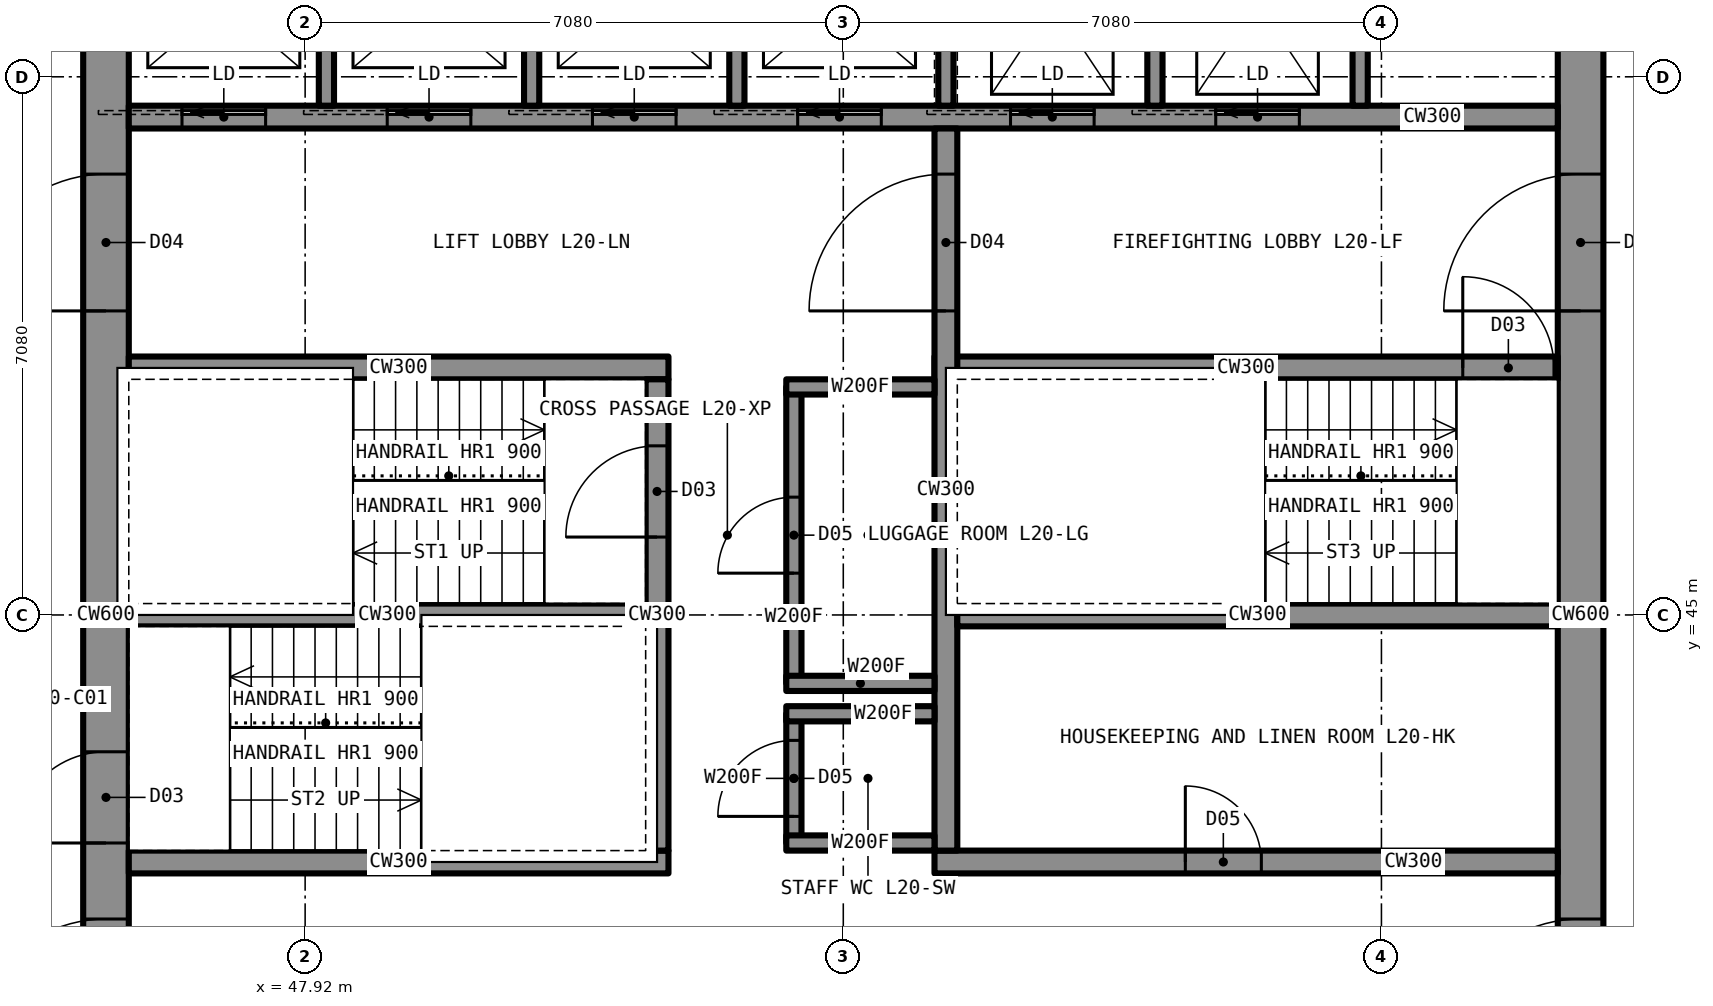
"""IFC4 building model, lengths in metres.
Left out: names, types, materials, properties, quantities, classifications, styles, units other than length and angle.
Written with IfcOpenShell. Run it as: python <this file> out.ifc"""

import sys

from ifc_helpers import new_model, si_unit, direction, frame, frame_2d, origin, place, context, subcontext, project, spatial, rectangle, extrude, element, fill, save


model = new_model("IFC4")
c1 = context("Model", 3, precision=1e-05, world=origin(), true_north=direction((0.0, 1.0)))
c2 = subcontext(c1, "Body", "Model", "MODEL_VIEW")
j1 = project(units=[si_unit("LENGTHUNIT", "METRE"), si_unit("PLANEANGLEUNIT", "RADIAN")], contexts=[c1])
p1 = place(None, origin())
s1 = spatial("IfcSite", under=j1, at=p1, CompositionType="ELEMENT")
p2 = place(p1, origin())
s2 = spatial("IfcBuilding", under=s1, at=p2, CompositionType="ELEMENT")
p3 = place(p2, frame((0.0, 0.0, 70.5)))
s3 = spatial("IfcBuildingStorey", under=s2, at=p3, CompositionType="ELEMENT", Elevation=70.5)
p4 = place(p3, frame((64.7, 35.6, 0.0), z_axis=(0.0, 0.0, 1.0), x_axis=(0.0, 1.0, 0.0)))
e1 = element("IfcWall", 1, at=p4, inside=s3, PredefinedType="SHEAR", context=c2, shape_type="SweptSolid", body=[
    extrude(rectangle(XDim=18.8, YDim=0.6, at=frame_2d((9.4, 0.0))), origin(), (0.0, 0.0, 1.0), 3.5),
])
p5 = place(p4, frame((13.4, 0.0, 0.0)))
e2 = element("IfcOpeningElement", 2, at=p5, cuts=e1, PredefinedType="OPENING", context=c2, shape_type="SweptSolid", body=[
    extrude(rectangle(XDim=1.8, YDim=2.2, at=frame_2d((0.9, 1.1))), frame((0.0, 0.31, 0.0), z_axis=(0.0, -1.0, 0.0), x_axis=(1.0, 0.0, 0.0)), (0.0, 0.0, 1.0), 0.62),
])
p6 = place(p4, frame((3.6, 0.0, 0.0)))
e3 = element("IfcOpeningElement", 3, at=p6, cuts=e1, PredefinedType="OPENING", context=c2, shape_type="SweptSolid", body=[
    extrude(rectangle(XDim=1.8, YDim=2.2, at=frame_2d((0.9, 1.1))), frame((0.0, 0.31, 0.0), z_axis=(0.0, -1.0, 0.0), x_axis=(1.0, 0.0, 0.0)), (0.0, 0.0, 1.0), 0.62),
])
p7 = place(p3, frame((45.3, 35.6, 0.0), z_axis=(0.0, 0.0, 1.0), x_axis=(0.0, 1.0, 0.0)))
e4 = element("IfcWall", 4, at=p7, inside=s3, PredefinedType="SHEAR", context=c2, shape_type="SweptSolid", body=[
    extrude(rectangle(XDim=18.8, YDim=0.6, at=frame_2d((9.4, 0.0))), origin(), (0.0, 0.0, 1.0), 3.5),
])
p8 = place(p7, frame((13.4, 0.0, 0.0)))
e5 = element("IfcOpeningElement", 5, at=p8, cuts=e4, PredefinedType="OPENING", context=c2, shape_type="SweptSolid", body=[
    extrude(rectangle(XDim=1.8, YDim=2.2, at=frame_2d((0.9, 1.1))), frame((0.0, 0.31, 0.0), z_axis=(0.0, -1.0, 0.0), x_axis=(1.0, 0.0, 0.0)), (0.0, 0.0, 1.0), 0.62),
])
p9 = place(p7, frame((3.6, 0.0, 0.0)))
e6 = element("IfcOpeningElement", 6, at=p9, cuts=e4, PredefinedType="OPENING", context=c2, shape_type="SweptSolid", body=[
    extrude(rectangle(XDim=1.8, YDim=2.2, at=frame_2d((0.9, 1.1))), frame((0.0, 0.31, 0.0), z_axis=(0.0, -1.0, 0.0), x_axis=(1.0, 0.0, 0.0)), (0.0, 0.0, 1.0), 0.62),
])
p10 = place(p7, frame((6.4, 0.0, 0.0)))
e7 = element("IfcOpeningElement", 7, at=p10, cuts=e4, PredefinedType="OPENING", context=c2, shape_type="SweptSolid", body=[
    extrude(rectangle(XDim=1.2, YDim=2.2, at=frame_2d((0.6, 1.1))), frame((0.0, 0.31, 0.0), z_axis=(0.0, -1.0, 0.0), x_axis=(1.0, 0.0, 0.0)), (0.0, 0.0, 1.0), 0.62),
])
p11 = place(p3, frame((45.6, 51.55, 0.0), z_axis=(0.0, 0.0, 1.0), x_axis=(1.0, 0.0, 0.0)))
e8 = element("IfcWall", 8, at=p11, inside=s3, PredefinedType="SHEAR", context=c2, shape_type="SweptSolid", body=[
    extrude(rectangle(XDim=18.8, YDim=0.3, at=frame_2d((9.4, 0.0))), origin(), (0.0, 0.0, 1.0), 3.5),
])
p12 = place(p11, frame((0.7, 0.0, 0.0)))
e9 = element("IfcOpeningElement", 9, at=p12, cuts=e8, PredefinedType="OPENING", context=c2, shape_type="SweptSolid", body=[
    extrude(rectangle(XDim=1.1, YDim=2.2, at=frame_2d((0.55, 1.1))), frame((0.0, 0.16, 0.0), z_axis=(0.0, -1.0, 0.0), x_axis=(1.0, 0.0, 0.0)), (0.0, 0.0, 1.0), 0.32),
])
p13 = place(p11, frame((3.4, 0.0, 0.0)))
e10 = element("IfcOpeningElement", 10, at=p13, cuts=e8, PredefinedType="OPENING", context=c2, shape_type="SweptSolid", body=[
    extrude(rectangle(XDim=1.1, YDim=2.2, at=frame_2d((0.55, 1.1))), frame((0.0, 0.16, 0.0), z_axis=(0.0, -1.0, 0.0), x_axis=(1.0, 0.0, 0.0)), (0.0, 0.0, 1.0), 0.32),
])
p14 = place(p11, frame((6.1, 0.0, 0.0)))
e11 = element("IfcOpeningElement", 11, at=p14, cuts=e8, PredefinedType="OPENING", context=c2, shape_type="SweptSolid", body=[
    extrude(rectangle(XDim=1.1, YDim=2.2, at=frame_2d((0.55, 1.1))), frame((0.0, 0.16, 0.0), z_axis=(0.0, -1.0, 0.0), x_axis=(1.0, 0.0, 0.0)), (0.0, 0.0, 1.0), 0.32),
])
p15 = place(p11, frame((8.8, 0.0, 0.0)))
e12 = element("IfcOpeningElement", 12, at=p15, cuts=e8, PredefinedType="OPENING", context=c2, shape_type="SweptSolid", body=[
    extrude(rectangle(XDim=1.1, YDim=2.2, at=frame_2d((0.55, 1.1))), frame((0.0, 0.16, 0.0), z_axis=(0.0, -1.0, 0.0), x_axis=(1.0, 0.0, 0.0)), (0.0, 0.0, 1.0), 0.32),
])
p16 = place(p11, frame((11.6, 0.0, 0.0)))
e13 = element("IfcOpeningElement", 13, at=p16, cuts=e8, PredefinedType="OPENING", context=c2, shape_type="SweptSolid", body=[
    extrude(rectangle(XDim=1.1, YDim=2.2, at=frame_2d((0.55, 1.1))), frame((0.0, 0.16, 0.0), z_axis=(0.0, -1.0, 0.0), x_axis=(1.0, 0.0, 0.0)), (0.0, 0.0, 1.0), 0.32),
])
p17 = place(p11, frame((14.3, 0.0, 0.0)))
e14 = element("IfcOpeningElement", 14, at=p17, cuts=e8, PredefinedType="OPENING", context=c2, shape_type="SweptSolid", body=[
    extrude(rectangle(XDim=1.1, YDim=2.2, at=frame_2d((0.55, 1.1))), frame((0.0, 0.16, 0.0), z_axis=(0.0, -1.0, 0.0), x_axis=(1.0, 0.0, 0.0)), (0.0, 0.0, 1.0), 0.32),
])
p18 = place(p3, frame((45.6, 48.25, 0.0), z_axis=(0.0, 0.0, 1.0), x_axis=(1.0, 0.0, 0.0)))
e15 = element("IfcWall", 15, at=p18, inside=s3, PredefinedType="SHEAR", context=c2, shape_type="SweptSolid", body=[
    extrude(rectangle(XDim=7.1, YDim=0.3, at=frame_2d((3.55, 0.0))), origin(), (0.0, 0.0, 1.0), 3.5),
])
p19 = place(p3, frame((56.2, 48.25, 0.0), z_axis=(0.0, 0.0, 1.0), x_axis=(1.0, 0.0, 0.0)))
e16 = element("IfcWall", 16, at=p19, inside=s3, PredefinedType="SHEAR", context=c2, shape_type="SweptSolid", body=[
    extrude(rectangle(XDim=8.2, YDim=0.3, at=frame_2d((4.1, 0.0))), origin(), (0.0, 0.0, 1.0), 3.5),
])
p20 = place(p19, frame((6.95, 0.0, 0.0)))
e17 = element("IfcOpeningElement", 17, at=p20, cuts=e16, PredefinedType="OPENING", context=c2, shape_type="SweptSolid", body=[
    extrude(rectangle(XDim=1.2, YDim=2.2, at=frame_2d((0.6, 1.1))), frame((0.0, 0.16, 0.0), z_axis=(0.0, -1.0, 0.0), x_axis=(1.0, 0.0, 0.0)), (0.0, 0.0, 1.0), 0.32),
])
p21 = place(p3, frame((45.6, 41.75, 0.0), z_axis=(0.0, 0.0, 1.0), x_axis=(1.0, 0.0, 0.0)))
e18 = element("IfcWall", 18, at=p21, inside=s3, PredefinedType="SHEAR", context=c2, shape_type="SweptSolid", body=[
    extrude(rectangle(XDim=7.1, YDim=0.3, at=frame_2d((3.55, 0.0))), origin(), (0.0, 0.0, 1.0), 3.5),
])
p22 = place(p3, frame((56.2, 41.75, 0.0), z_axis=(0.0, 0.0, 1.0), x_axis=(1.0, 0.0, 0.0)))
e19 = element("IfcWall", 19, at=p22, inside=s3, PredefinedType="SHEAR", context=c2, shape_type="SweptSolid", body=[
    extrude(rectangle(XDim=8.2, YDim=0.3, at=frame_2d((4.1, 0.0))), origin(), (0.0, 0.0, 1.0), 3.5),
])
p23 = place(p22, frame((3.3, 0.0, 0.0)))
e20 = element("IfcOpeningElement", 20, at=p23, cuts=e19, PredefinedType="OPENING", context=c2, shape_type="SweptSolid", body=[
    extrude(rectangle(XDim=1.0, YDim=2.1, at=frame_2d((0.5, 1.05))), frame((0.0, 0.16, 0.0), z_axis=(0.0, -1.0, 0.0), x_axis=(1.0, 0.0, 0.0)), (0.0, 0.0, 1.0), 0.32),
])
p24 = place(p3, frame((52.55, 41.9, 0.0), z_axis=(0.0, 0.0, 1.0), x_axis=(0.0, 1.0, 0.0)))
e21 = element("IfcWall", 21, at=p24, inside=s3, PredefinedType="SHEAR", context=c2, shape_type="SweptSolid", body=[
    extrude(rectangle(XDim=6.2, YDim=0.3, at=frame_2d((3.1, 0.0))), origin(), (0.0, 0.0, 1.0), 3.5),
])
p25 = place(p24, frame((4.125, 0.0, 0.0)))
e22 = element("IfcOpeningElement", 22, at=p25, cuts=e21, PredefinedType="OPENING", context=c2, shape_type="SweptSolid", body=[
    extrude(rectangle(XDim=1.2, YDim=2.2, at=frame_2d((0.6, 1.1))), frame((0.0, 0.16, 0.0), z_axis=(0.0, -1.0, 0.0), x_axis=(1.0, 0.0, 0.0)), (0.0, 0.0, 1.0), 0.32),
])
p26 = place(p3, frame((56.35, 41.9, 0.0), z_axis=(0.0, 0.0, 1.0), x_axis=(0.0, 1.0, 0.0)))
e23 = element("IfcWall", 23, at=p26, inside=s3, PredefinedType="SHEAR", context=c2, shape_type="SweptSolid", body=[
    extrude(rectangle(XDim=9.5, YDim=0.3, at=frame_2d((4.75, 0.0))), origin(), (0.0, 0.0, 1.0), 3.5),
])
p27 = place(p26, frame((7.1, 0.0, 0.0)))
e24 = element("IfcOpeningElement", 24, at=p27, cuts=e23, PredefinedType="OPENING", context=c2, shape_type="SweptSolid", body=[
    extrude(rectangle(XDim=1.8, YDim=2.2, at=frame_2d((0.9, 1.1))), frame((0.0, 0.16, 0.0), z_axis=(0.0, -1.0, 0.0), x_axis=(1.0, 0.0, 0.0)), (0.0, 0.0, 1.0), 0.32),
])
p28 = place(p3, frame((45.6, 45.0, 0.0), z_axis=(0.0, 0.0, 1.0), x_axis=(1.0, 0.0, 0.0)))
e25 = element("IfcWall", 25, at=p28, inside=s3, PredefinedType="SHEAR", context=c2, shape_type="SweptSolid", body=[
    extrude(rectangle(XDim=6.8, YDim=0.3, at=frame_2d((3.4, 0.0))), origin(), (0.0, 0.0, 1.0), 3.5),
])
p29 = place(p3, frame((56.5, 45.0, 0.0), z_axis=(0.0, 0.0, 1.0), x_axis=(1.0, 0.0, 0.0)))
e26 = element("IfcWall", 26, at=p29, inside=s3, PredefinedType="SHEAR", context=c2, shape_type="SweptSolid", body=[
    extrude(rectangle(XDim=7.9, YDim=0.3, at=frame_2d((3.95, 0.0))), origin(), (0.0, 0.0, 1.0), 3.5),
])
p30 = place(p3, frame((54.35, 42.0, 0.0), z_axis=(0.0, 0.0, 1.0), x_axis=(0.0, 1.0, 0.0)))
e27 = element("IfcWall", 27, at=p30, inside=s3, PredefinedType="PARTITIONING", context=c2, shape_type="SweptSolid", body=[
    extrude(rectangle(XDim=1.5, YDim=0.2, at=frame_2d((0.75, 0.0))), origin(), (0.0, 0.0, 1.0), 3.33),
])
p31 = place(p30, frame((0.25, 0.0, 0.0)))
e28 = element("IfcOpeningElement", 28, at=p31, cuts=e27, PredefinedType="OPENING", context=c2, shape_type="SweptSolid", body=[
    extrude(rectangle(XDim=1.0, YDim=2.1, at=frame_2d((0.5, 1.05))), frame((0.0, 0.11, 0.0), z_axis=(0.0, -1.0, 0.0), x_axis=(1.0, 0.0, 0.0)), (0.0, 0.0, 1.0), 0.22),
])
for number, where, z_axis, x_axis in (
    (29, (54.25, 42.0, 0.0), (0.0, 0.0, 1.0), (1.0, 0.0, 0.0)),
    (30, (54.25, 43.5, 0.0), (0.0, 0.0, 1.0), (1.0, 0.0, 0.0)),
):
    element("IfcWall", number, at=place(p3, frame(where, z_axis=z_axis, x_axis=x_axis)), inside=s3, PredefinedType="PARTITIONING", context=c2, shape_type="SweptSolid", body=[
        extrude(rectangle(XDim=1.95, YDim=0.2, at=frame_2d((0.975, 0.0))), origin(), (0.0, 0.0, 1.0), 3.33),
    ])
p32 = place(p3, frame((54.35, 45.5, 0.0), z_axis=(0.0, 0.0, 1.0), x_axis=(0.0, 1.0, 0.0)))
e31 = element("IfcWall", 31, at=p32, inside=s3, PredefinedType="PARTITIONING", context=c2, shape_type="SweptSolid", body=[
    extrude(rectangle(XDim=2.5, YDim=0.2, at=frame_2d((1.25, 0.0))), origin(), (0.0, 0.0, 1.0), 3.33),
])
p33 = place(p32, frame((0.75, 0.0, 0.0)))
e32 = element("IfcOpeningElement", 32, at=p33, cuts=e31, PredefinedType="OPENING", context=c2, shape_type="SweptSolid", body=[
    extrude(rectangle(XDim=1.0, YDim=2.1, at=frame_2d((0.5, 1.05))), frame((0.0, 0.11, 0.0), z_axis=(0.0, -1.0, 0.0), x_axis=(1.0, 0.0, 0.0)), (0.0, 0.0, 1.0), 0.22),
])
for number, where, z_axis, x_axis in (
    (33, (54.25, 45.5, 0.0), (0.0, 0.0, 1.0), (1.0, 0.0, 0.0)),
    (34, (54.25, 48.0, 0.0), (0.0, 0.0, 1.0), (1.0, 0.0, 0.0)),
):
    element("IfcWall", number, at=place(p3, frame(where, z_axis=z_axis, x_axis=x_axis)), inside=s3, PredefinedType="PARTITIONING", context=c2, shape_type="SweptSolid", body=[
        extrude(rectangle(XDim=1.95, YDim=0.2, at=frame_2d((0.975, 0.0))), origin(), (0.0, 0.0, 1.0), 3.33),
    ])
for number, where, z_axis, x_axis in (
    (35, (48.2, 51.7, 0.0), (0.0, 0.0, 1.0), (0.0, 1.0, 0.0)),
    (36, (50.9, 51.7, 0.0), (0.0, 0.0, 1.0), (0.0, 1.0, 0.0)),
    (37, (53.6, 51.7, 0.0), (0.0, 0.0, 1.0), (0.0, 1.0, 0.0)),
    (38, (59.1, 51.7, 0.0), (0.0, 0.0, 1.0), (0.0, 1.0, 0.0)),
    (39, (61.8, 51.7, 0.0), (0.0, 0.0, 1.0), (0.0, 1.0, 0.0)),
    (40, (56.35, 51.7, 0.0), (0.0, 0.0, 1.0), (0.0, 1.0, 0.0)),
):
    element("IfcWall", number, at=place(p3, frame(where, z_axis=z_axis, x_axis=x_axis)), inside=s3, PredefinedType="PARTITIONING", context=c2, shape_type="SweptSolid", body=[
        extrude(rectangle(XDim=2.7, YDim=0.2, at=frame_2d((1.35, 0.0))), origin(), (0.0, 0.0, 1.0), 3.33),
    ])
p34 = place(p31, origin())
e41 = element("IfcDoor", 41, at=p34, inside=s3, OperationType="SINGLE_SWING_LEFT", PredefinedType="DOOR", context=c2, shape_type="SweptSolid", body=[
    extrude(rectangle(XDim=1.0, YDim=2.1, at=frame_2d((0.5, 1.05))), frame((0.0, 0.025, 0.0), z_axis=(0.0, -1.0, 0.0), x_axis=(1.0, 0.0, 0.0)), (0.0, 0.0, 1.0), 0.05),
])
fill(e28, e41)
p35 = place(p33, origin())
e42 = element("IfcDoor", 42, at=p35, inside=s3, OperationType="SINGLE_SWING_LEFT", PredefinedType="DOOR", context=c2, shape_type="SweptSolid", body=[
    extrude(rectangle(XDim=1.0, YDim=2.1, at=frame_2d((0.5, 1.05))), frame((0.0, 0.025, 0.0), z_axis=(0.0, -1.0, 0.0), x_axis=(1.0, 0.0, 0.0)), (0.0, 0.0, 1.0), 0.05),
])
fill(e32, e42)
p36 = place(p8, origin())
e43 = element("IfcDoor", 43, at=p36, inside=s3, OperationType="DOUBLE_DOOR_SINGLE_SWING", PredefinedType="DOOR", context=c2, shape_type="SweptSolid", body=[
    extrude(rectangle(XDim=1.8, YDim=2.2, at=frame_2d((0.9, 1.1))), frame((0.0, 0.025, 0.0), z_axis=(0.0, -1.0, 0.0), x_axis=(1.0, 0.0, 0.0)), (0.0, 0.0, 1.0), 0.05),
])
fill(e5, e43)
p37 = place(p9, origin())
e44 = element("IfcDoor", 44, at=p37, inside=s3, OperationType="DOUBLE_DOOR_SINGLE_SWING", PredefinedType="DOOR", context=c2, shape_type="SweptSolid", body=[
    extrude(rectangle(XDim=1.8, YDim=2.2, at=frame_2d((0.9, 1.1))), frame((0.0, 0.025, 0.0), z_axis=(0.0, -1.0, 0.0), x_axis=(1.0, 0.0, 0.0)), (0.0, 0.0, 1.0), 0.05),
])
fill(e6, e44)
p38 = place(p5, origin())
e45 = element("IfcDoor", 45, at=p38, inside=s3, OperationType="DOUBLE_DOOR_SINGLE_SWING", PredefinedType="DOOR", context=c2, shape_type="SweptSolid", body=[
    extrude(rectangle(XDim=1.8, YDim=2.2, at=frame_2d((0.9, 1.1))), frame((0.0, 0.025, 0.0), z_axis=(0.0, -1.0, 0.0), x_axis=(1.0, 0.0, 0.0)), (0.0, 0.0, 1.0), 0.05),
])
fill(e2, e45)
p39 = place(p6, origin())
e46 = element("IfcDoor", 46, at=p39, inside=s3, OperationType="DOUBLE_DOOR_SINGLE_SWING", PredefinedType="DOOR", context=c2, shape_type="SweptSolid", body=[
    extrude(rectangle(XDim=1.8, YDim=2.2, at=frame_2d((0.9, 1.1))), frame((0.0, 0.025, 0.0), z_axis=(0.0, -1.0, 0.0), x_axis=(1.0, 0.0, 0.0)), (0.0, 0.0, 1.0), 0.05),
])
fill(e3, e46)
p40 = place(p27, origin())
e47 = element("IfcDoor", 47, at=p40, inside=s3, OperationType="DOUBLE_DOOR_SINGLE_SWING", PredefinedType="DOOR", context=c2, shape_type="SweptSolid", body=[
    extrude(rectangle(XDim=1.8, YDim=2.2, at=frame_2d((0.9, 1.1))), frame((0.0, 0.025, 0.0), z_axis=(0.0, -1.0, 0.0), x_axis=(1.0, 0.0, 0.0)), (0.0, 0.0, 1.0), 0.05),
])
fill(e24, e47)
p41 = place(p25, origin())
e48 = element("IfcDoor", 48, at=p41, inside=s3, OperationType="SINGLE_SWING_LEFT", PredefinedType="DOOR", context=c2, shape_type="SweptSolid", body=[
    extrude(rectangle(XDim=1.2, YDim=2.2, at=frame_2d((0.6, 1.1))), frame((0.0, 0.025, 0.0), z_axis=(0.0, -1.0, 0.0), x_axis=(1.0, 0.0, 0.0)), (0.0, 0.0, 1.0), 0.05),
])
fill(e22, e48)
p42 = place(p10, origin())
e49 = element("IfcDoor", 49, at=p42, inside=s3, OperationType="SINGLE_SWING_LEFT", PredefinedType="DOOR", context=c2, shape_type="SweptSolid", body=[
    extrude(rectangle(XDim=1.2, YDim=2.2, at=frame_2d((0.6, 1.1))), frame((0.0, 0.025, 0.0), z_axis=(0.0, -1.0, 0.0), x_axis=(1.0, 0.0, 0.0)), (0.0, 0.0, 1.0), 0.05),
])
fill(e7, e49)
p43 = place(p20, origin())
e50 = element("IfcDoor", 50, at=p43, inside=s3, OperationType="SINGLE_SWING_LEFT", PredefinedType="DOOR", context=c2, shape_type="SweptSolid", body=[
    extrude(rectangle(XDim=1.2, YDim=2.2, at=frame_2d((0.6, 1.1))), frame((0.0, 0.025, 0.0), z_axis=(0.0, -1.0, 0.0), x_axis=(1.0, 0.0, 0.0)), (0.0, 0.0, 1.0), 0.05),
])
fill(e17, e50)
p44 = place(p23, origin())
e51 = element("IfcDoor", 51, at=p44, inside=s3, OperationType="SINGLE_SWING_LEFT", PredefinedType="DOOR", context=c2, shape_type="SweptSolid", body=[
    extrude(rectangle(XDim=1.0, YDim=2.1, at=frame_2d((0.5, 1.05))), frame((0.0, 0.025, 0.0), z_axis=(0.0, -1.0, 0.0), x_axis=(1.0, 0.0, 0.0)), (0.0, 0.0, 1.0), 0.05),
])
fill(e20, e51)
p45 = place(p12, origin())
e52 = element("IfcDoor", 52, at=p45, inside=s3, OperationType="SLIDING_TO_LEFT", PredefinedType="DOOR", context=c2, shape_type="SweptSolid", body=[
    extrude(rectangle(XDim=1.1, YDim=2.2, at=frame_2d((0.55, 1.1))), frame((0.0, 0.025, 0.0), z_axis=(0.0, -1.0, 0.0), x_axis=(1.0, 0.0, 0.0)), (0.0, 0.0, 1.0), 0.05),
])
fill(e9, e52)
p46 = place(p13, origin())
e53 = element("IfcDoor", 53, at=p46, inside=s3, OperationType="SLIDING_TO_LEFT", PredefinedType="DOOR", context=c2, shape_type="SweptSolid", body=[
    extrude(rectangle(XDim=1.1, YDim=2.2, at=frame_2d((0.55, 1.1))), frame((0.0, 0.025, 0.0), z_axis=(0.0, -1.0, 0.0), x_axis=(1.0, 0.0, 0.0)), (0.0, 0.0, 1.0), 0.05),
])
fill(e10, e53)
p47 = place(p14, origin())
e54 = element("IfcDoor", 54, at=p47, inside=s3, OperationType="SLIDING_TO_LEFT", PredefinedType="DOOR", context=c2, shape_type="SweptSolid", body=[
    extrude(rectangle(XDim=1.1, YDim=2.2, at=frame_2d((0.55, 1.1))), frame((0.0, 0.025, 0.0), z_axis=(0.0, -1.0, 0.0), x_axis=(1.0, 0.0, 0.0)), (0.0, 0.0, 1.0), 0.05),
])
fill(e11, e54)
p48 = place(p15, origin())
e55 = element("IfcDoor", 55, at=p48, inside=s3, OperationType="SLIDING_TO_LEFT", PredefinedType="DOOR", context=c2, shape_type="SweptSolid", body=[
    extrude(rectangle(XDim=1.1, YDim=2.2, at=frame_2d((0.55, 1.1))), frame((0.0, 0.025, 0.0), z_axis=(0.0, -1.0, 0.0), x_axis=(1.0, 0.0, 0.0)), (0.0, 0.0, 1.0), 0.05),
])
fill(e12, e55)
p49 = place(p16, origin())
e56 = element("IfcDoor", 56, at=p49, inside=s3, OperationType="SLIDING_TO_LEFT", PredefinedType="DOOR", context=c2, shape_type="SweptSolid", body=[
    extrude(rectangle(XDim=1.1, YDim=2.2, at=frame_2d((0.55, 1.1))), frame((0.0, 0.025, 0.0), z_axis=(0.0, -1.0, 0.0), x_axis=(1.0, 0.0, 0.0)), (0.0, 0.0, 1.0), 0.05),
])
fill(e13, e56)
p50 = place(p17, origin())
e57 = element("IfcDoor", 57, at=p50, inside=s3, OperationType="SLIDING_TO_LEFT", PredefinedType="DOOR", context=c2, shape_type="SweptSolid", body=[
    extrude(rectangle(XDim=1.1, YDim=2.2, at=frame_2d((0.55, 1.1))), frame((0.0, 0.025, 0.0), z_axis=(0.0, -1.0, 0.0), x_axis=(1.0, 0.0, 0.0)), (0.0, 0.0, 1.0), 0.05),
])
fill(e14, e57)
save(model, sys.argv[1])
